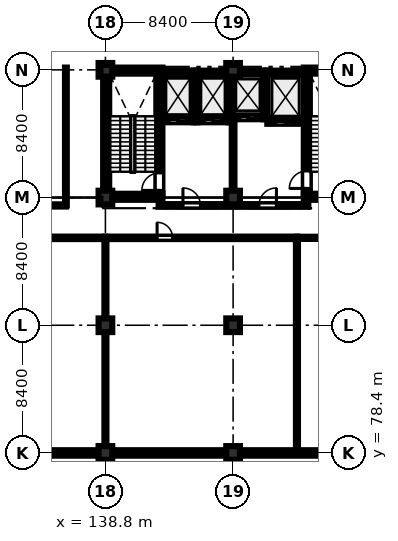
"""IFC4 building model, lengths in metres.
Left out: names, types, materials, properties, quantities, classifications, styles, units other than length and angle.
Written with IfcOpenShell. Run it as: python <this file> out.ifc"""

import sys

from ifc_helpers import new_model, si_unit, direction, frame, frame_2d, origin, origin_2d, place, context, subcontext, project, spatial, rectangle, extrude, element, fill, save


model = new_model("IFC4")
c1 = context("Model", 3, precision=1e-05, world=origin(), true_north=direction((0.0, 1.0)))
c2 = subcontext(c1, "Body", "Model", "MODEL_VIEW")
j1 = project(units=[si_unit("LENGTHUNIT", "METRE"), si_unit("PLANEANGLEUNIT", "RADIAN")], contexts=[c1])
p1 = place(None, origin())
s1 = spatial("IfcSite", under=j1, at=p1, CompositionType="ELEMENT")
p2 = place(p1, origin())
s2 = spatial("IfcBuilding", under=s1, at=p2, CompositionType="ELEMENT")
p3 = place(p2, frame((0.0, 0.0, 10.2)))
s3 = spatial("IfcBuildingStorey", under=s2, at=p3, CompositionType="ELEMENT", Elevation=10.2)
for number, where, z_axis, x_axis in (
    (1, (138.8, 78.4, 0.0), (0.0, 0.0, 1.0), (1.0, 0.0, 0.0)),
    (2, (138.8, 86.8, 0.0), (0.0, 0.0, 1.0), (1.0, 0.0, 0.0)),
    (3, (138.8, 95.2, 0.0), (0.0, 0.0, 1.0), (1.0, 0.0, 0.0)),
    (4, (138.8, 103.6, 0.0), (0.0, 0.0, 1.0), (1.0, 0.0, 0.0)),
    (5, (147.2, 78.4, 0.0), (0.0, 0.0, 1.0), (1.0, 0.0, 0.0)),
    (6, (147.2, 86.8, 0.0), (0.0, 0.0, 1.0), (1.0, 0.0, 0.0)),
    (7, (147.2, 95.2, 0.0), (0.0, 0.0, 1.0), (1.0, 0.0, 0.0)),
    (8, (147.2, 103.6, 0.0), (0.0, 0.0, 1.0), (1.0, 0.0, 0.0)),
):
    element("IfcColumn", number, at=place(p3, frame(where, z_axis=z_axis, x_axis=x_axis)), inside=s3, PredefinedType="COLUMN", context=c2, shape_type="SweptSolid", body=[
        extrude(rectangle(XDim=0.9, YDim=0.9, at=origin_2d()), origin(), (0.0, 0.0, 1.0), 4.26),
    ])
for number, where, z_axis, x_axis in (
    (9, (138.65, 95.25, 0.0), (0.0, 0.0, 1.0), (1.0, 0.0, 0.0)),
    (10, (138.65, 103.55, 0.0), (0.0, 0.0, 1.0), (1.0, 0.0, 0.0)),
):
    element("IfcWall", number, at=place(p3, frame(where, z_axis=z_axis, x_axis=x_axis)), inside=s3, PredefinedType="SHEAR", context=c2, shape_type="SweptSolid", body=[
        extrude(rectangle(XDim=3.9, YDim=0.4, at=frame_2d((1.95, 0.0))), origin(), (0.0, 0.0, 1.0), 4.26),
    ])
p4 = place(p3, frame((138.85, 95.45, 0.0), z_axis=(0.0, 0.0, 1.0), x_axis=(0.0, 1.0, 0.0)))
e11 = element("IfcWall", 11, at=p4, inside=s3, PredefinedType="SHEAR", context=c2, shape_type="SweptSolid", body=[
    extrude(rectangle(XDim=7.9, YDim=0.4, at=frame_2d((3.95, 0.0))), origin(), (0.0, 0.0, 1.0), 4.26),
])
p5 = place(p3, frame((142.35, 95.45, 0.0), z_axis=(0.0, 0.0, 1.0), x_axis=(0.0, 1.0, 0.0)))
e12 = element("IfcWall", 12, at=p5, inside=s3, PredefinedType="SHEAR", context=c2, shape_type="SweptSolid", body=[
    extrude(rectangle(XDim=7.9, YDim=0.4, at=frame_2d((3.95, 0.0))), origin(), (0.0, 0.0, 1.0), 4.26),
])
p6 = place(p5, frame((0.22, 0.0, 0.0)))
e13 = element("IfcOpeningElement", 13, at=p6, cuts=e12, PredefinedType="OPENING", context=c2, shape_type="SweptSolid", body=[
    extrude(rectangle(XDim=1.15, YDim=2.15, at=frame_2d((0.575, 1.075))), frame((0.0, 0.21, 0.0), z_axis=(0.0, -1.0, 0.0), x_axis=(1.0, 0.0, 0.0)), (0.0, 0.0, 1.0), 0.42),
])
for number, where, z_axis, x_axis in (
    (14, (151.85, 95.25, 0.0), (0.0, 0.0, 1.0), (1.0, 0.0, 0.0)),
    (15, (151.85, 103.55, 0.0), (0.0, 0.0, 1.0), (1.0, 0.0, 0.0)),
):
    element("IfcWall", number, at=place(p3, frame(where, z_axis=z_axis, x_axis=x_axis)), inside=s3, PredefinedType="SHEAR", context=c2, shape_type="SweptSolid", body=[
        extrude(rectangle(XDim=3.9, YDim=0.4, at=frame_2d((1.95, 0.0))), origin(), (0.0, 0.0, 1.0), 4.26),
    ])
p7 = place(p3, frame((152.05, 95.45, 0.0), z_axis=(0.0, 0.0, 1.0), x_axis=(0.0, 1.0, 0.0)))
e16 = element("IfcWall", 16, at=p7, inside=s3, PredefinedType="SHEAR", context=c2, shape_type="SweptSolid", body=[
    extrude(rectangle(XDim=7.9, YDim=0.4, at=frame_2d((3.95, 0.0))), origin(), (0.0, 0.0, 1.0), 4.26),
])
p8 = place(p7, frame((0.35, 0.0, 0.0)))
e17 = element("IfcOpeningElement", 17, at=p8, cuts=e16, PredefinedType="OPENING", context=c2, shape_type="SweptSolid", body=[
    extrude(rectangle(XDim=1.15, YDim=2.15, at=frame_2d((0.575, 1.075))), frame((0.0, 0.21, 0.0), z_axis=(0.0, -1.0, 0.0), x_axis=(1.0, 0.0, 0.0)), (0.0, 0.0, 1.0), 0.42),
])
p9 = place(p3, frame((142.55, 100.275, 0.0), z_axis=(0.0, 0.0, 1.0), x_axis=(1.0, 0.0, 0.0)))
e18 = element("IfcWall", 18, at=p9, inside=s3, PredefinedType="SHEAR", context=c2, shape_type="SweptSolid", body=[
    extrude(rectangle(XDim=2.05, YDim=0.25, at=frame_2d((1.025, 0.0))), origin(), (0.0, 0.0, 1.0), 4.26),
])
p10 = place(p9, frame((0.475, 0.0, 0.0)))
e19 = element("IfcOpeningElement", 19, at=p10, cuts=e18, PredefinedType="OPENING", context=c2, shape_type="SweptSolid", body=[
    extrude(rectangle(XDim=1.1, YDim=2.15, at=frame_2d((0.55, 1.075))), frame((0.0, 0.135, 0.0), z_axis=(0.0, -1.0, 0.0), x_axis=(1.0, 0.0, 0.0)), (0.0, 0.0, 1.0), 0.27),
])
p11 = place(p3, frame((142.55, 103.425, 0.0), z_axis=(0.0, 0.0, 1.0), x_axis=(1.0, 0.0, 0.0)))
e20 = element("IfcWall", 20, at=p11, inside=s3, PredefinedType="SHEAR", context=c2, shape_type="SweptSolid", body=[
    extrude(rectangle(XDim=2.05, YDim=0.25, at=frame_2d((1.025, 0.0))), origin(), (0.0, 0.0, 1.0), 4.26),
])
p12 = place(p3, frame((144.725, 100.15, 0.0), z_axis=(0.0, 0.0, 1.0), x_axis=(0.0, 1.0, 0.0)))
e21 = element("IfcWall", 21, at=p12, inside=s3, PredefinedType="SHEAR", context=c2, shape_type="SweptSolid", body=[
    extrude(rectangle(XDim=3.4, YDim=0.25, at=frame_2d((1.7, 0.0))), origin(), (0.0, 0.0, 1.0), 4.26),
])
p13 = place(p3, frame((144.85, 100.275, 0.0), z_axis=(0.0, 0.0, 1.0), x_axis=(1.0, 0.0, 0.0)))
e22 = element("IfcWall", 22, at=p13, inside=s3, PredefinedType="SHEAR", context=c2, shape_type="SweptSolid", body=[
    extrude(rectangle(XDim=2.05, YDim=0.25, at=frame_2d((1.025, 0.0))), origin(), (0.0, 0.0, 1.0), 4.26),
])
p14 = place(p13, frame((0.465, 0.0, 0.0)))
e23 = element("IfcOpeningElement", 23, at=p14, cuts=e22, PredefinedType="OPENING", context=c2, shape_type="SweptSolid", body=[
    extrude(rectangle(XDim=1.12, YDim=2.15, at=frame_2d((0.56, 1.075))), frame((0.0, 0.135, 0.0), z_axis=(0.0, -1.0, 0.0), x_axis=(1.0, 0.0, 0.0)), (0.0, 0.0, 1.0), 0.27),
])
p15 = place(p3, frame((144.85, 103.425, 0.0), z_axis=(0.0, 0.0, 1.0), x_axis=(1.0, 0.0, 0.0)))
e24 = element("IfcWall", 24, at=p15, inside=s3, PredefinedType="SHEAR", context=c2, shape_type="SweptSolid", body=[
    extrude(rectangle(XDim=2.05, YDim=0.25, at=frame_2d((1.025, 0.0))), origin(), (0.0, 0.0, 1.0), 4.26),
])
p16 = place(p3, frame((147.025, 100.15, 0.0), z_axis=(0.0, 0.0, 1.0), x_axis=(0.0, 1.0, 0.0)))
e25 = element("IfcWall", 25, at=p16, inside=s3, PredefinedType="SHEAR", context=c2, shape_type="SweptSolid", body=[
    extrude(rectangle(XDim=3.4, YDim=0.25, at=frame_2d((1.7, 0.0))), origin(), (0.0, 0.0, 1.0), 4.26),
])
p17 = place(p3, frame((147.15, 100.475, 0.0), z_axis=(0.0, 0.0, 1.0), x_axis=(1.0, 0.0, 0.0)))
e26 = element("IfcWall", 26, at=p17, inside=s3, PredefinedType="SHEAR", context=c2, shape_type="SweptSolid", body=[
    extrude(rectangle(XDim=2.05, YDim=0.25, at=frame_2d((1.025, 0.0))), origin(), (0.0, 0.0, 1.0), 4.26),
])
p18 = place(p17, frame((0.495, 0.0, 0.0)))
e27 = element("IfcOpeningElement", 27, at=p18, cuts=e26, PredefinedType="OPENING", context=c2, shape_type="SweptSolid", body=[
    extrude(rectangle(XDim=1.06, YDim=2.15, at=frame_2d((0.53, 1.075))), frame((0.0, 0.135, 0.0), z_axis=(0.0, -1.0, 0.0), x_axis=(1.0, 0.0, 0.0)), (0.0, 0.0, 1.0), 0.27),
])
p19 = place(p3, frame((147.15, 103.425, 0.0), z_axis=(0.0, 0.0, 1.0), x_axis=(1.0, 0.0, 0.0)))
e28 = element("IfcWall", 28, at=p19, inside=s3, PredefinedType="SHEAR", context=c2, shape_type="SweptSolid", body=[
    extrude(rectangle(XDim=2.05, YDim=0.25, at=frame_2d((1.025, 0.0))), origin(), (0.0, 0.0, 1.0), 4.26),
])
p20 = place(p3, frame((149.325, 100.35, 0.0), z_axis=(0.0, 0.0, 1.0), x_axis=(0.0, 1.0, 0.0)))
e29 = element("IfcWall", 29, at=p20, inside=s3, PredefinedType="SHEAR", context=c2, shape_type="SweptSolid", body=[
    extrude(rectangle(XDim=3.2, YDim=0.25, at=frame_2d((1.6, 0.0))), origin(), (0.0, 0.0, 1.0), 4.26),
])
p21 = place(p3, frame((149.45, 100.175, 0.0), z_axis=(0.0, 0.0, 1.0), x_axis=(1.0, 0.0, 0.0)))
e30 = element("IfcWall", 30, at=p21, inside=s3, PredefinedType="SHEAR", context=c2, shape_type="SweptSolid", body=[
    extrude(rectangle(XDim=2.4, YDim=0.25, at=frame_2d((1.2, 0.0))), origin(), (0.0, 0.0, 1.0), 4.26),
])
p22 = place(p21, frame((0.55, 0.0, 0.0)))
e31 = element("IfcOpeningElement", 31, at=p22, cuts=e30, PredefinedType="OPENING", context=c2, shape_type="SweptSolid", body=[
    extrude(rectangle(XDim=1.3, YDim=2.25, at=frame_2d((0.65, 1.125))), frame((0.0, 0.135, 0.0), z_axis=(0.0, -1.0, 0.0), x_axis=(1.0, 0.0, 0.0)), (0.0, 0.0, 1.0), 0.27),
])
p23 = place(p3, frame((149.45, 103.425, 0.0), z_axis=(0.0, 0.0, 1.0), x_axis=(1.0, 0.0, 0.0)))
e32 = element("IfcWall", 32, at=p23, inside=s3, PredefinedType="SHEAR", context=c2, shape_type="SweptSolid", body=[
    extrude(rectangle(XDim=2.4, YDim=0.25, at=frame_2d((1.2, 0.0))), origin(), (0.0, 0.0, 1.0), 4.26),
])
p24 = place(p3, frame((138.35, 78.4, 0.0), z_axis=(0.0, 0.0, 1.0), x_axis=(-1.0, 0.0, 0.0)))
e33 = element("IfcWall", 33, at=p24, inside=s3, PredefinedType="STANDARD", context=c2, shape_type="SweptSolid", body=[
    extrude(rectangle(XDim=7.5, YDim=0.36, at=frame_2d((3.75, 0.0))), origin(), (0.0, 0.0, 1.0), 3.16),
])
p25 = place(p24, frame((1.15, 0.0, 0.95)))
e34 = element("IfcOpeningElement", 34, at=p25, cuts=e33, PredefinedType="OPENING", context=c2, shape_type="SweptSolid", body=[
    extrude(rectangle(XDim=1.5, YDim=1.5, at=frame_2d((0.75, 0.75))), frame((0.0, 0.19, 0.0), z_axis=(0.0, -1.0, 0.0), x_axis=(1.0, 0.0, 0.0)), (0.0, 0.0, 1.0), 0.38),
])
p26 = place(p3, frame((146.75, 78.4, 0.0), z_axis=(0.0, 0.0, 1.0), x_axis=(-1.0, 0.0, 0.0)))
e35 = element("IfcWall", 35, at=p26, inside=s3, PredefinedType="STANDARD", context=c2, shape_type="SweptSolid", body=[
    extrude(rectangle(XDim=7.5, YDim=0.36, at=frame_2d((3.75, 0.0))), origin(), (0.0, 0.0, 1.0), 3.16),
])
p27 = place(p26, frame((1.15, 0.0, 0.95)))
e36 = element("IfcOpeningElement", 36, at=p27, cuts=e35, PredefinedType="OPENING", context=c2, shape_type="SweptSolid", body=[
    extrude(rectangle(XDim=1.5, YDim=1.5, at=frame_2d((0.75, 0.75))), frame((0.0, 0.19, 0.0), z_axis=(0.0, -1.0, 0.0), x_axis=(1.0, 0.0, 0.0)), (0.0, 0.0, 1.0), 0.38),
])
p28 = place(p3, frame((155.15, 78.4, 0.0), z_axis=(0.0, 0.0, 1.0), x_axis=(-1.0, 0.0, 0.0)))
e37 = element("IfcWall", 37, at=p28, inside=s3, PredefinedType="STANDARD", context=c2, shape_type="SweptSolid", body=[
    extrude(rectangle(XDim=7.5, YDim=0.36, at=frame_2d((3.75, 0.0))), origin(), (0.0, 0.0, 1.0), 3.16),
])
p29 = place(p28, frame((1.15, 0.0, 0.95)))
e38 = element("IfcOpeningElement", 38, at=p29, cuts=e37, PredefinedType="OPENING", context=c2, shape_type="SweptSolid", body=[
    extrude(rectangle(XDim=1.5, YDim=1.5, at=frame_2d((0.75, 0.75))), frame((0.0, 0.19, 0.0), z_axis=(0.0, -1.0, 0.0), x_axis=(1.0, 0.0, 0.0)), (0.0, 0.0, 1.0), 0.38),
])
p30 = place(p3, frame((142.3, 94.68, 0.0), z_axis=(0.0, 0.0, 1.0), x_axis=(1.0, 0.0, 0.0)))
e39 = element("IfcWall", 39, at=p30, inside=s3, PredefinedType="STANDARD", context=c2, shape_type="SweptSolid", body=[
    extrude(rectangle(XDim=4.8, YDim=0.18, at=frame_2d((2.4, 0.0))), origin(), (0.0, 0.0, 1.0), 4.26),
])
p31 = place(p30, frame((1.6, 0.0, 0.0)))
e40 = element("IfcOpeningElement", 40, at=p31, cuts=e39, PredefinedType="OPENING", context=c2, shape_type="SweptSolid", body=[
    extrude(rectangle(XDim=1.15, YDim=2.15, at=frame_2d((0.575, 1.075))), frame((0.0, 0.1, 0.0), z_axis=(0.0, -1.0, 0.0), x_axis=(1.0, 0.0, 0.0)), (0.0, 0.0, 1.0), 0.2),
])
p32 = place(p3, frame((147.3, 94.68, 0.0), z_axis=(0.0, 0.0, 1.0), x_axis=(1.0, 0.0, 0.0)))
e41 = element("IfcWall", 41, at=p32, inside=s3, PredefinedType="STANDARD", context=c2, shape_type="SweptSolid", body=[
    extrude(rectangle(XDim=4.85, YDim=0.18, at=frame_2d((2.425, 0.0))), origin(), (0.0, 0.0, 1.0), 4.26),
])
p33 = place(p32, frame((1.6, 0.0, 0.0)))
e42 = element("IfcOpeningElement", 42, at=p33, cuts=e41, PredefinedType="OPENING", context=c2, shape_type="SweptSolid", body=[
    extrude(rectangle(XDim=1.15, YDim=2.15, at=frame_2d((0.575, 1.075))), frame((0.0, 0.1, 0.0), z_axis=(0.0, -1.0, 0.0), x_axis=(1.0, 0.0, 0.0)), (0.0, 0.0, 1.0), 0.2),
])
p34 = place(p3, frame((147.2, 95.75, 0.0), z_axis=(0.0, 0.0, 1.0), x_axis=(0.0, 1.0, 0.0)))
e43 = element("IfcWall", 43, at=p34, inside=s3, PredefinedType="STANDARD", context=c2, shape_type="SweptSolid", body=[
    extrude(rectangle(XDim=4.5, YDim=0.18, at=frame_2d((2.25, 0.0))), origin(), (0.0, 0.0, 1.0), 3.51),
])
p35 = place(p3, frame((136.2, 94.68, 0.0), z_axis=(0.0, 0.0, 1.0), x_axis=(0.0, 1.0, 0.0)))
e44 = element("IfcWall", 44, at=p35, inside=s3, PredefinedType="PARTITIONING", context=c2, shape_type="SweptSolid", body=[
    extrude(rectangle(XDim=9.07, YDim=0.12, at=frame_2d((4.535, 0.0))), origin(), (0.0, 0.0, 1.0), 4.26),
])
p36 = place(p3, frame((122.4, 94.68, 0.0), z_axis=(0.0, 0.0, 1.0), x_axis=(1.0, 0.0, 0.0)))
e45 = element("IfcWall", 45, at=p36, inside=s3, PredefinedType="PARTITIONING", context=c2, shape_type="SweptSolid", body=[
    extrude(rectangle(XDim=13.8, YDim=0.145, at=frame_2d((6.9, 0.0))), origin(), (0.0, 0.0, 1.0), 4.26),
])
p37 = place(p36, frame((3.2, 0.0, 0.0)))
e46 = element("IfcOpeningElement", 46, at=p37, cuts=e45, PredefinedType="OPENING", context=c2, shape_type="SweptSolid", body=[
    extrude(rectangle(XDim=1.02, YDim=2.15, at=frame_2d((0.51, 1.075))), frame((0.0, 0.083, 0.0), z_axis=(0.0, -1.0, 0.0), x_axis=(1.0, 0.0, 0.0)), (0.0, 0.0, 1.0), 0.165),
])
p38 = place(p3, frame((122.15, 92.55, 0.0), z_axis=(0.0, 0.0, 1.0), x_axis=(1.0, 0.0, 0.0)))
e47 = element("IfcWall", 47, at=p38, inside=s3, PredefinedType="PARTITIONING", context=c2, shape_type="SweptSolid", body=[
    extrude(rectangle(XDim=16.65, YDim=0.165, at=frame_2d((8.325, 0.0))), origin(), (0.0, 0.0, 1.0), 4.26),
])
p39 = place(p38, frame((3.75, 0.0, 0.0)))
e48 = element("IfcOpeningElement", 48, at=p39, cuts=e47, PredefinedType="OPENING", context=c2, shape_type="SweptSolid", body=[
    extrude(rectangle(XDim=1.7, YDim=2.2, at=frame_2d((0.85, 1.1))), frame((0.0, 0.093, 0.0), z_axis=(0.0, -1.0, 0.0), x_axis=(1.0, 0.0, 0.0)), (0.0, 0.0, 1.0), 0.185),
])
p40 = place(p3, frame((138.8, 92.55, 0.0), z_axis=(0.0, 0.0, 1.0), x_axis=(1.0, 0.0, 0.0)))
e49 = element("IfcWall", 49, at=p40, inside=s3, PredefinedType="PARTITIONING", context=c2, shape_type="SweptSolid", body=[
    extrude(rectangle(XDim=12.6, YDim=0.165, at=frame_2d((6.3, 0.0))), origin(), (0.0, 0.0, 1.0), 4.26),
])
p41 = place(p40, frame((3.4, 0.0, 0.0)))
e50 = element("IfcOpeningElement", 50, at=p41, cuts=e49, PredefinedType="OPENING", context=c2, shape_type="SweptSolid", body=[
    extrude(rectangle(XDim=1.02, YDim=2.15, at=frame_2d((0.51, 1.075))), frame((0.0, 0.093, 0.0), z_axis=(0.0, -1.0, 0.0), x_axis=(1.0, 0.0, 0.0)), (0.0, 0.0, 1.0), 0.185),
])
p42 = place(p3, frame((138.8, 78.55, 0.0), z_axis=(0.0, 0.0, 1.0), x_axis=(0.0, 1.0, 0.0)))
e51 = element("IfcWall", 51, at=p42, inside=s3, PredefinedType="PARTITIONING", context=c2, shape_type="SweptSolid", body=[
    extrude(rectangle(XDim=14.0, YDim=0.135, at=frame_2d((7.0, 0.0))), origin(), (0.0, 0.0, 1.0), 3.51),
])
p43 = place(p3, frame((151.4, 92.55, 0.0), z_axis=(0.0, 0.0, 1.0), x_axis=(1.0, 0.0, 0.0)))
e52 = element("IfcWall", 52, at=p43, inside=s3, PredefinedType="PARTITIONING", context=c2, shape_type="SweptSolid", body=[
    extrude(rectangle(XDim=11.95, YDim=0.145, at=frame_2d((5.975, 0.0))), origin(), (0.0, 0.0, 1.0), 4.26),
])
p44 = place(p43, frame((6.8, 0.0, 0.0)))
e53 = element("IfcOpeningElement", 53, at=p44, cuts=e52, PredefinedType="OPENING", context=c2, shape_type="SweptSolid", body=[
    extrude(rectangle(XDim=1.08, YDim=2.15, at=frame_2d((0.54, 1.075))), frame((0.0, 0.083, 0.0), z_axis=(0.0, -1.0, 0.0), x_axis=(1.0, 0.0, 0.0)), (0.0, 0.0, 1.0), 0.165),
])
p45 = place(p3, frame((151.4, 78.55, 0.0), z_axis=(0.0, 0.0, 1.0), x_axis=(0.0, 1.0, 0.0)))
e54 = element("IfcWall", 54, at=p45, inside=s3, PredefinedType="PARTITIONING", context=c2, shape_type="SweptSolid", body=[
    extrude(rectangle(XDim=14.0, YDim=0.135, at=frame_2d((7.0, 0.0))), origin(), (0.0, 0.0, 1.0), 3.71),
])
p46 = place(p25, origin())
e55 = element("IfcWindow", 55, at=p46, inside=s3, PartitioningType="DOUBLE_PANEL_VERTICAL", PredefinedType="WINDOW", context=c2, shape_type="SweptSolid", body=[
    extrude(rectangle(XDim=1.5, YDim=1.5, at=frame_2d((0.75, 0.75))), frame((0.0, 0.03, 0.0), z_axis=(0.0, -1.0, 0.0), x_axis=(1.0, 0.0, 0.0)), (0.0, 0.0, 1.0), 0.06),
])
fill(e34, e55)
p47 = place(p27, origin())
e56 = element("IfcWindow", 56, at=p47, inside=s3, PartitioningType="DOUBLE_PANEL_VERTICAL", PredefinedType="WINDOW", context=c2, shape_type="SweptSolid", body=[
    extrude(rectangle(XDim=1.5, YDim=1.5, at=frame_2d((0.75, 0.75))), frame((0.0, 0.03, 0.0), z_axis=(0.0, -1.0, 0.0), x_axis=(1.0, 0.0, 0.0)), (0.0, 0.0, 1.0), 0.06),
])
fill(e36, e56)
p48 = place(p29, origin())
e57 = element("IfcWindow", 57, at=p48, inside=s3, PartitioningType="DOUBLE_PANEL_VERTICAL", PredefinedType="WINDOW", context=c2, shape_type="SweptSolid", body=[
    extrude(rectangle(XDim=1.5, YDim=1.5, at=frame_2d((0.75, 0.75))), frame((0.0, 0.03, 0.0), z_axis=(0.0, -1.0, 0.0), x_axis=(1.0, 0.0, 0.0)), (0.0, 0.0, 1.0), 0.06),
])
fill(e38, e57)
p49 = place(p31, origin())
e58 = element("IfcDoor", 58, at=p49, inside=s3, OperationType="SINGLE_SWING_LEFT", PredefinedType="DOOR", context=c2, shape_type="SweptSolid", body=[
    extrude(rectangle(XDim=1.15, YDim=2.15, at=frame_2d((0.575, 1.075))), frame((0.0, 0.025, 0.0), z_axis=(0.0, -1.0, 0.0), x_axis=(1.0, 0.0, 0.0)), (0.0, 0.0, 1.0), 0.05),
])
fill(e40, e58)
p50 = place(p33, origin())
e59 = element("IfcDoor", 59, at=p50, inside=s3, OperationType="SINGLE_SWING_RIGHT", PredefinedType="DOOR", context=c2, shape_type="SweptSolid", body=[
    extrude(rectangle(XDim=1.15, YDim=2.15, at=frame_2d((0.575, 1.075))), frame((0.0, 0.025, 0.0), z_axis=(0.0, -1.0, 0.0), x_axis=(1.0, 0.0, 0.0)), (0.0, 0.0, 1.0), 0.05),
])
fill(e42, e59)
p51 = place(p41, origin())
e60 = element("IfcDoor", 60, at=p51, inside=s3, OperationType="SINGLE_SWING_LEFT", PredefinedType="DOOR", context=c2, shape_type="SweptSolid", body=[
    extrude(rectangle(XDim=1.02, YDim=2.15, at=frame_2d((0.51, 1.075))), frame((0.0, 0.025, 0.0), z_axis=(0.0, -1.0, 0.0), x_axis=(1.0, 0.0, 0.0)), (0.0, 0.0, 1.0), 0.05),
])
fill(e50, e60)
p52 = place(p6, origin())
e61 = element("IfcDoor", 61, at=p52, inside=s3, OperationType="SINGLE_SWING_LEFT", PredefinedType="DOOR", context=c2, shape_type="SweptSolid", body=[
    extrude(rectangle(XDim=1.15, YDim=2.15, at=frame_2d((0.575, 1.075))), frame((0.0, 0.025, 0.0), z_axis=(0.0, -1.0, 0.0), x_axis=(1.0, 0.0, 0.0)), (0.0, 0.0, 1.0), 0.05),
])
fill(e13, e61)
p53 = place(p8, origin())
e62 = element("IfcDoor", 62, at=p53, inside=s3, OperationType="SINGLE_SWING_LEFT", PredefinedType="DOOR", context=c2, shape_type="SweptSolid", body=[
    extrude(rectangle(XDim=1.15, YDim=2.15, at=frame_2d((0.575, 1.075))), frame((0.0, 0.025, 0.0), z_axis=(0.0, -1.0, 0.0), x_axis=(1.0, 0.0, 0.0)), (0.0, 0.0, 1.0), 0.05),
])
fill(e17, e62)
p54 = place(p10, origin())
e63 = element("IfcDoor", 63, at=p54, inside=s3, OperationType="SLIDING_TO_LEFT", PredefinedType="DOOR", context=c2, shape_type="SweptSolid", body=[
    extrude(rectangle(XDim=1.1, YDim=2.15, at=frame_2d((0.55, 1.075))), frame((0.0, 0.025, 0.0), z_axis=(0.0, -1.0, 0.0), x_axis=(1.0, 0.0, 0.0)), (0.0, 0.0, 1.0), 0.05),
])
fill(e19, e63)
p55 = place(p14, origin())
e64 = element("IfcDoor", 64, at=p55, inside=s3, OperationType="SLIDING_TO_LEFT", PredefinedType="DOOR", context=c2, shape_type="SweptSolid", body=[
    extrude(rectangle(XDim=1.12, YDim=2.15, at=frame_2d((0.56, 1.075))), frame((0.0, 0.025, 0.0), z_axis=(0.0, -1.0, 0.0), x_axis=(1.0, 0.0, 0.0)), (0.0, 0.0, 1.0), 0.05),
])
fill(e23, e64)
p56 = place(p18, origin())
e65 = element("IfcDoor", 65, at=p56, inside=s3, OperationType="SLIDING_TO_LEFT", PredefinedType="DOOR", context=c2, shape_type="SweptSolid", body=[
    extrude(rectangle(XDim=1.06, YDim=2.15, at=frame_2d((0.53, 1.075))), frame((0.0, 0.025, 0.0), z_axis=(0.0, -1.0, 0.0), x_axis=(1.0, 0.0, 0.0)), (0.0, 0.0, 1.0), 0.05),
])
fill(e27, e65)
p57 = place(p22, origin())
e66 = element("IfcDoor", 66, at=p57, inside=s3, OperationType="SLIDING_TO_LEFT", PredefinedType="DOOR", context=c2, shape_type="SweptSolid", body=[
    extrude(rectangle(XDim=1.3, YDim=2.25, at=frame_2d((0.65, 1.125))), frame((0.0, 0.025, 0.0), z_axis=(0.0, -1.0, 0.0), x_axis=(1.0, 0.0, 0.0)), (0.0, 0.0, 1.0), 0.05),
])
fill(e31, e66)
save(model, sys.argv[1])
